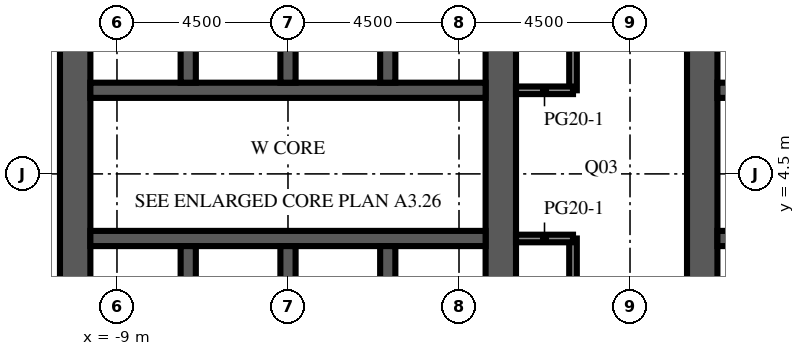
"""IFC4 building model, lengths in metres.
Left out: names, types, materials, properties, quantities, classifications, styles, units other than length and angle.
Written with IfcOpenShell. Run it as: python <this file> out.ifc"""

import sys

from ifc_helpers import new_model, si_unit, direction, frame, frame_2d, origin, place, context, subcontext, project, spatial, rectangle, extrude, element, fill, save


model = new_model("IFC4")
c1 = context("Model", 3, precision=1e-05, world=origin(), true_north=direction((0.0, 1.0)))
c2 = subcontext(c1, "Body", "Model", "MODEL_VIEW")
j1 = project(units=[si_unit("LENGTHUNIT", "METRE"), si_unit("PLANEANGLEUNIT", "RADIAN")], contexts=[c1])
p1 = place(None, origin())
s1 = spatial("IfcSite", under=j1, at=p1, CompositionType="ELEMENT")
p2 = place(p1, origin())
s2 = spatial("IfcBuilding", under=s1, at=p2, CompositionType="ELEMENT")
p3 = place(p2, frame((0.0, 0.0, 165.0)))
s3 = spatial("IfcBuildingStorey", under=s2, at=p3, CompositionType="ELEMENT", Elevation=165.0)
p4 = place(p3, frame((-10.1, -9.0, 0.0), z_axis=(0.0, 0.0, 1.0), x_axis=(0.0, 1.0, 0.0)))
e1 = element("IfcWall", 1, at=p4, inside=s3, PredefinedType="SHEAR", context=c2, shape_type="SweptSolid", body=[
    extrude(rectangle(XDim=27.5, YDim=0.8, at=frame_2d((13.75, 0.0))), origin(), (0.0, 0.0, 1.0), 4.1),
])
p5 = place(p4, frame((12.55, 0.0, 0.0)))
e2 = element("IfcOpeningElement", 2, at=p5, cuts=e1, PredefinedType="OPENING", context=c2, shape_type="SweptSolid", body=[
    extrude(rectangle(XDim=2.4, YDim=2.4, at=frame_2d((1.2, 1.2))), frame((0.0, 0.41, 0.0), z_axis=(0.0, -1.0, 0.0), x_axis=(1.0, 0.0, 0.0)), (0.0, 0.0, 1.0), 0.82),
])
p6 = place(p4, frame((6.825, 0.0, 0.0)))
e3 = element("IfcOpeningElement", 3, at=p6, cuts=e1, PredefinedType="OPENING", context=c2, shape_type="SweptSolid", body=[
    extrude(rectangle(XDim=1.2, YDim=2.1, at=frame_2d((0.6, 1.05))), frame((0.0, 0.41, 0.0), z_axis=(0.0, -1.0, 0.0), x_axis=(1.0, 0.0, 0.0)), (0.0, 0.0, 1.0), 0.82),
])
p7 = place(p4, frame((19.475, 0.0, 0.0)))
e4 = element("IfcOpeningElement", 4, at=p7, cuts=e1, PredefinedType="OPENING", context=c2, shape_type="SweptSolid", body=[
    extrude(rectangle(XDim=1.2, YDim=2.1, at=frame_2d((0.6, 1.05))), frame((0.0, 0.41, 0.0), z_axis=(0.0, -1.0, 0.0), x_axis=(1.0, 0.0, 0.0)), (0.0, 0.0, 1.0), 0.82),
])
p8 = place(p3, frame((1.1, -9.0, 0.0), z_axis=(0.0, 0.0, 1.0), x_axis=(0.0, 1.0, 0.0)))
e5 = element("IfcWall", 5, at=p8, inside=s3, PredefinedType="SHEAR", context=c2, shape_type="SweptSolid", body=[
    extrude(rectangle(XDim=27.5, YDim=0.8, at=frame_2d((13.75, 0.0))), origin(), (0.0, 0.0, 1.0), 4.1),
])
p9 = place(p8, frame((12.55, 0.0, 0.0)))
e6 = element("IfcOpeningElement", 6, at=p9, cuts=e5, PredefinedType="OPENING", context=c2, shape_type="SweptSolid", body=[
    extrude(rectangle(XDim=2.4, YDim=2.4, at=frame_2d((1.2, 1.2))), frame((0.0, 0.41, 0.0), z_axis=(0.0, -1.0, 0.0), x_axis=(1.0, 0.0, 0.0)), (0.0, 0.0, 1.0), 0.82),
])
p10 = place(p8, frame((3.95, 0.0, 0.0)))
e7 = element("IfcOpeningElement", 7, at=p10, cuts=e5, PredefinedType="OPENING", context=c2, shape_type="SweptSolid", body=[
    extrude(rectangle(XDim=1.2, YDim=2.1, at=frame_2d((0.6, 1.05))), frame((0.0, 0.41, 0.0), z_axis=(0.0, -1.0, 0.0), x_axis=(1.0, 0.0, 0.0)), (0.0, 0.0, 1.0), 0.82),
])
p11 = place(p8, frame((22.35, 0.0, 0.0)))
e8 = element("IfcOpeningElement", 8, at=p11, cuts=e5, PredefinedType="OPENING", context=c2, shape_type="SweptSolid", body=[
    extrude(rectangle(XDim=1.2, YDim=2.1, at=frame_2d((0.6, 1.05))), frame((0.0, 0.41, 0.0), z_axis=(0.0, -1.0, 0.0), x_axis=(1.0, 0.0, 0.0)), (0.0, 0.0, 1.0), 0.82),
])
p12 = place(p3, frame((-9.7, 2.8, 0.0), z_axis=(0.0, 0.0, 1.0), x_axis=(1.0, 0.0, 0.0)))
e9 = element("IfcWall", 9, at=p12, inside=s3, PredefinedType="SHEAR", context=c2, shape_type="SweptSolid", body=[
    extrude(rectangle(XDim=10.4, YDim=0.4, at=frame_2d((5.2, 0.0))), origin(), (0.0, 0.0, 1.0), 4.1),
])
p13 = place(p12, frame((0.738, 0.0, 0.0)))
e10 = element("IfcOpeningElement", 10, at=p13, cuts=e9, PredefinedType="OPENING", context=c2, shape_type="SweptSolid", body=[
    extrude(rectangle(XDim=1.1, YDim=2.1, at=frame_2d((0.55, 1.05))), frame((0.0, 0.21, 0.0), z_axis=(0.0, -1.0, 0.0), x_axis=(1.0, 0.0, 0.0)), (0.0, 0.0, 1.0), 0.42),
])
p14 = place(p12, frame((3.337, 0.0, 0.0)))
e11 = element("IfcOpeningElement", 11, at=p14, cuts=e9, PredefinedType="OPENING", context=c2, shape_type="SweptSolid", body=[
    extrude(rectangle(XDim=1.1, YDim=2.1, at=frame_2d((0.55, 1.05))), frame((0.0, 0.21, 0.0), z_axis=(0.0, -1.0, 0.0), x_axis=(1.0, 0.0, 0.0)), (0.0, 0.0, 1.0), 0.42),
])
p15 = place(p12, frame((6.012, 0.0, 0.0)))
e12 = element("IfcOpeningElement", 12, at=p15, cuts=e9, PredefinedType="OPENING", context=c2, shape_type="SweptSolid", body=[
    extrude(rectangle(XDim=1.0, YDim=2.1, at=frame_2d((0.5, 1.05))), frame((0.0, 0.21, 0.0), z_axis=(0.0, -1.0, 0.0), x_axis=(1.0, 0.0, 0.0)), (0.0, 0.0, 1.0), 0.42),
])
p16 = place(p12, frame((8.613, 0.0, 0.0)))
e13 = element("IfcOpeningElement", 13, at=p16, cuts=e9, PredefinedType="OPENING", context=c2, shape_type="SweptSolid", body=[
    extrude(rectangle(XDim=1.0, YDim=2.1, at=frame_2d((0.5, 1.05))), frame((0.0, 0.21, 0.0), z_axis=(0.0, -1.0, 0.0), x_axis=(1.0, 0.0, 0.0)), (0.0, 0.0, 1.0), 0.42),
])
p17 = place(p3, frame((-9.7, 6.7, 0.0), z_axis=(0.0, 0.0, 1.0), x_axis=(1.0, 0.0, 0.0)))
e14 = element("IfcWall", 14, at=p17, inside=s3, PredefinedType="SHEAR", context=c2, shape_type="SweptSolid", body=[
    extrude(rectangle(XDim=10.4, YDim=0.4, at=frame_2d((5.2, 0.0))), origin(), (0.0, 0.0, 1.0), 4.1),
])
p18 = place(p17, frame((3.337, 0.0, 0.0)))
e15 = element("IfcOpeningElement", 15, at=p18, cuts=e14, PredefinedType="OPENING", context=c2, shape_type="SweptSolid", body=[
    extrude(rectangle(XDim=1.1, YDim=2.1, at=frame_2d((0.55, 1.05))), frame((0.0, 0.21, 0.0), z_axis=(0.0, -1.0, 0.0), x_axis=(1.0, 0.0, 0.0)), (0.0, 0.0, 1.0), 0.42),
])
p19 = place(p17, frame((5.962, 0.0, 0.0)))
e16 = element("IfcOpeningElement", 16, at=p19, cuts=e14, PredefinedType="OPENING", context=c2, shape_type="SweptSolid", body=[
    extrude(rectangle(XDim=1.1, YDim=2.1, at=frame_2d((0.55, 1.05))), frame((0.0, 0.21, 0.0), z_axis=(0.0, -1.0, 0.0), x_axis=(1.0, 0.0, 0.0)), (0.0, 0.0, 1.0), 0.42),
])
p20 = place(p17, frame((8.663, 0.0, 0.0)))
e17 = element("IfcOpeningElement", 17, at=p20, cuts=e14, PredefinedType="OPENING", context=c2, shape_type="SweptSolid", body=[
    extrude(rectangle(XDim=1.1, YDim=2.1, at=frame_2d((0.55, 1.05))), frame((0.0, 0.21, 0.0), z_axis=(0.0, -1.0, 0.0), x_axis=(1.0, 0.0, 0.0)), (0.0, 0.0, 1.0), 0.42),
])
p21 = place(p17, frame((0.688, 0.0, 0.0)))
e18 = element("IfcOpeningElement", 18, at=p21, cuts=e14, PredefinedType="OPENING", context=c2, shape_type="SweptSolid", body=[
    extrude(rectangle(XDim=1.0, YDim=2.1, at=frame_2d((0.5, 1.05))), frame((0.0, 0.21, 0.0), z_axis=(0.0, -1.0, 0.0), x_axis=(1.0, 0.0, 0.0)), (0.0, 0.0, 1.0), 0.42),
])
for number, where, z_axis, x_axis in (
    (19, (-7.125, -0.3, 0.0), (0.0, 0.0, 1.0), (0.0, 1.0, 0.0)),
    (20, (-7.125, 6.9, 0.0), (0.0, 0.0, 1.0), (0.0, 1.0, 0.0)),
    (21, (-4.5, -0.3, 0.0), (0.0, 0.0, 1.0), (0.0, 1.0, 0.0)),
    (22, (-4.5, 6.9, 0.0), (0.0, 0.0, 1.0), (0.0, 1.0, 0.0)),
    (23, (-1.875, -0.3, 0.0), (0.0, 0.0, 1.0), (0.0, 1.0, 0.0)),
    (24, (-1.875, 6.9, 0.0), (0.0, 0.0, 1.0), (0.0, 1.0, 0.0)),
):
    element("IfcWall", number, at=place(p3, frame(where, z_axis=z_axis, x_axis=x_axis)), inside=s3, PredefinedType="SHEAR", context=c2, shape_type="SweptSolid", body=[
        extrude(rectangle(XDim=2.9, YDim=0.4, at=frame_2d((1.45, 0.0))), origin(), (0.0, 0.0, 1.0), 4.1),
    ])
p22 = place(p3, frame((6.4, -9.0, 0.0), z_axis=(0.0, 0.0, 1.0), x_axis=(0.0, 1.0, 0.0)))
e25 = element("IfcWall", 25, at=p22, inside=s3, PredefinedType="SHEAR", context=c2, shape_type="SweptSolid", body=[
    extrude(rectangle(XDim=27.5, YDim=0.8, at=frame_2d((13.75, 0.0))), origin(), (0.0, 0.0, 1.0), 4.1),
])
p23 = place(p22, frame((12.55, 0.0, 0.0)))
e26 = element("IfcOpeningElement", 26, at=p23, cuts=e25, PredefinedType="OPENING", context=c2, shape_type="SweptSolid", body=[
    extrude(rectangle(XDim=2.4, YDim=2.4, at=frame_2d((1.2, 1.2))), frame((0.0, 0.41, 0.0), z_axis=(0.0, -1.0, 0.0), x_axis=(1.0, 0.0, 0.0)), (0.0, 0.0, 1.0), 0.82),
])
p24 = place(p22, frame((3.95, 0.0, 0.0)))
e27 = element("IfcOpeningElement", 27, at=p24, cuts=e25, PredefinedType="OPENING", context=c2, shape_type="SweptSolid", body=[
    extrude(rectangle(XDim=1.2, YDim=2.1, at=frame_2d((0.6, 1.05))), frame((0.0, 0.41, 0.0), z_axis=(0.0, -1.0, 0.0), x_axis=(1.0, 0.0, 0.0)), (0.0, 0.0, 1.0), 0.82),
])
p25 = place(p22, frame((22.35, 0.0, 0.0)))
e28 = element("IfcOpeningElement", 28, at=p25, cuts=e25, PredefinedType="OPENING", context=c2, shape_type="SweptSolid", body=[
    extrude(rectangle(XDim=1.2, YDim=2.1, at=frame_2d((0.6, 1.05))), frame((0.0, 0.41, 0.0), z_axis=(0.0, -1.0, 0.0), x_axis=(1.0, 0.0, 0.0)), (0.0, 0.0, 1.0), 0.82),
])
p26 = place(p3, frame((6.8, 2.8, 0.0), z_axis=(0.0, 0.0, 1.0), x_axis=(1.0, 0.0, 0.0)))
e29 = element("IfcWall", 29, at=p26, inside=s3, PredefinedType="SHEAR", context=c2, shape_type="SweptSolid", body=[
    extrude(rectangle(XDim=10.4, YDim=0.4, at=frame_2d((5.2, 0.0))), origin(), (0.0, 0.0, 1.0), 4.1),
])
p27 = place(p26, frame((0.738, 0.0, 0.0)))
e30 = element("IfcOpeningElement", 30, at=p27, cuts=e29, PredefinedType="OPENING", context=c2, shape_type="SweptSolid", body=[
    extrude(rectangle(XDim=1.1, YDim=2.1, at=frame_2d((0.55, 1.05))), frame((0.0, 0.21, 0.0), z_axis=(0.0, -1.0, 0.0), x_axis=(1.0, 0.0, 0.0)), (0.0, 0.0, 1.0), 0.42),
])
p28 = place(p26, frame((3.337, 0.0, 0.0)))
e31 = element("IfcOpeningElement", 31, at=p28, cuts=e29, PredefinedType="OPENING", context=c2, shape_type="SweptSolid", body=[
    extrude(rectangle(XDim=1.1, YDim=2.1, at=frame_2d((0.55, 1.05))), frame((0.0, 0.21, 0.0), z_axis=(0.0, -1.0, 0.0), x_axis=(1.0, 0.0, 0.0)), (0.0, 0.0, 1.0), 0.42),
])
p29 = place(p26, frame((6.012, 0.0, 0.0)))
e32 = element("IfcOpeningElement", 32, at=p29, cuts=e29, PredefinedType="OPENING", context=c2, shape_type="SweptSolid", body=[
    extrude(rectangle(XDim=1.0, YDim=2.1, at=frame_2d((0.5, 1.05))), frame((0.0, 0.21, 0.0), z_axis=(0.0, -1.0, 0.0), x_axis=(1.0, 0.0, 0.0)), (0.0, 0.0, 1.0), 0.42),
])
p30 = place(p26, frame((8.613, 0.0, 0.0)))
e33 = element("IfcOpeningElement", 33, at=p30, cuts=e29, PredefinedType="OPENING", context=c2, shape_type="SweptSolid", body=[
    extrude(rectangle(XDim=1.0, YDim=2.1, at=frame_2d((0.5, 1.05))), frame((0.0, 0.21, 0.0), z_axis=(0.0, -1.0, 0.0), x_axis=(1.0, 0.0, 0.0)), (0.0, 0.0, 1.0), 0.42),
])
p31 = place(p3, frame((6.8, 6.7, 0.0), z_axis=(0.0, 0.0, 1.0), x_axis=(1.0, 0.0, 0.0)))
e34 = element("IfcWall", 34, at=p31, inside=s3, PredefinedType="SHEAR", context=c2, shape_type="SweptSolid", body=[
    extrude(rectangle(XDim=10.4, YDim=0.4, at=frame_2d((5.2, 0.0))), origin(), (0.0, 0.0, 1.0), 4.1),
])
p32 = place(p31, frame((3.337, 0.0, 0.0)))
e35 = element("IfcOpeningElement", 35, at=p32, cuts=e34, PredefinedType="OPENING", context=c2, shape_type="SweptSolid", body=[
    extrude(rectangle(XDim=1.1, YDim=2.1, at=frame_2d((0.55, 1.05))), frame((0.0, 0.21, 0.0), z_axis=(0.0, -1.0, 0.0), x_axis=(1.0, 0.0, 0.0)), (0.0, 0.0, 1.0), 0.42),
])
p33 = place(p31, frame((5.962, 0.0, 0.0)))
e36 = element("IfcOpeningElement", 36, at=p33, cuts=e34, PredefinedType="OPENING", context=c2, shape_type="SweptSolid", body=[
    extrude(rectangle(XDim=1.1, YDim=2.1, at=frame_2d((0.55, 1.05))), frame((0.0, 0.21, 0.0), z_axis=(0.0, -1.0, 0.0), x_axis=(1.0, 0.0, 0.0)), (0.0, 0.0, 1.0), 0.42),
])
p34 = place(p31, frame((8.663, 0.0, 0.0)))
e37 = element("IfcOpeningElement", 37, at=p34, cuts=e34, PredefinedType="OPENING", context=c2, shape_type="SweptSolid", body=[
    extrude(rectangle(XDim=1.1, YDim=2.1, at=frame_2d((0.55, 1.05))), frame((0.0, 0.21, 0.0), z_axis=(0.0, -1.0, 0.0), x_axis=(1.0, 0.0, 0.0)), (0.0, 0.0, 1.0), 0.42),
])
p35 = place(p31, frame((0.688, 0.0, 0.0)))
e38 = element("IfcOpeningElement", 38, at=p35, cuts=e34, PredefinedType="OPENING", context=c2, shape_type="SweptSolid", body=[
    extrude(rectangle(XDim=1.0, YDim=2.1, at=frame_2d((0.5, 1.05))), frame((0.0, 0.21, 0.0), z_axis=(0.0, -1.0, 0.0), x_axis=(1.0, 0.0, 0.0)), (0.0, 0.0, 1.0), 0.42),
])
p36 = place(p3, frame((3.0, -3.5, 0.0), z_axis=(0.0, 0.0, 1.0), x_axis=(0.0, 1.0, 0.0)))
e39 = element("IfcWall", 39, at=p36, inside=s3, PredefinedType="PARTITIONING", context=c2, shape_type="SweptSolid", body=[
    extrude(rectangle(XDim=6.3, YDim=0.2, at=frame_2d((3.15, 0.0))), origin(), (0.0, 0.0, 1.0), 3.65),
])
p37 = place(p36, frame((2.85, 0.0, 0.0)))
e40 = element("IfcOpeningElement", 40, at=p37, cuts=e39, PredefinedType="OPENING", context=c2, shape_type="SweptSolid", body=[
    extrude(rectangle(XDim=1.0, YDim=2.1, at=frame_2d((0.5, 1.05))), frame((0.0, 0.11, 0.0), z_axis=(0.0, -1.0, 0.0), x_axis=(1.0, 0.0, 0.0)), (0.0, 0.0, 1.0), 0.22),
])
p38 = place(p3, frame((3.0, 6.7, 0.0), z_axis=(0.0, 0.0, 1.0), x_axis=(0.0, 1.0, 0.0)))
e41 = element("IfcWall", 41, at=p38, inside=s3, PredefinedType="PARTITIONING", context=c2, shape_type="SweptSolid", body=[
    extrude(rectangle(XDim=11.8, YDim=0.2, at=frame_2d((5.9, 0.0))), origin(), (0.0, 0.0, 1.0), 3.65),
])
p39 = place(p38, frame((5.35, 0.0, 0.0)))
e42 = element("IfcOpeningElement", 42, at=p39, cuts=e41, PredefinedType="OPENING", context=c2, shape_type="SweptSolid", body=[
    extrude(rectangle(XDim=1.0, YDim=2.1, at=frame_2d((0.5, 1.05))), frame((0.0, 0.11, 0.0), z_axis=(0.0, -1.0, 0.0), x_axis=(1.0, 0.0, 0.0)), (0.0, 0.0, 1.0), 0.22),
])
for number, where, z_axis, x_axis in (
    (43, (1.5, 2.8, 0.0), (0.0, 0.0, 1.0), (1.0, 0.0, 0.0)),
    (44, (1.5, 6.7, 0.0), (0.0, 0.0, 1.0), (1.0, 0.0, 0.0)),
):
    element("IfcWall", number, at=place(p3, frame(where, z_axis=z_axis, x_axis=x_axis)), inside=s3, PredefinedType="PARTITIONING", context=c2, shape_type="SweptSolid", body=[
        extrude(rectangle(XDim=1.5, YDim=0.2, at=frame_2d((0.75, 0.0))), origin(), (0.0, 0.0, 1.0), 3.65),
    ])
p40 = place(p13, origin())
e45 = element("IfcDoor", 45, at=p40, inside=s3, OperationType="DOUBLE_DOOR_SLIDING", PredefinedType="DOOR", context=c2, shape_type="SweptSolid", body=[
    extrude(rectangle(XDim=1.1, YDim=2.1, at=frame_2d((0.55, 1.05))), frame((0.0, 0.025, 0.0), z_axis=(0.0, -1.0, 0.0), x_axis=(1.0, 0.0, 0.0)), (0.0, 0.0, 1.0), 0.05),
])
fill(e10, e45)
p41 = place(p14, origin())
e46 = element("IfcDoor", 46, at=p41, inside=s3, OperationType="DOUBLE_DOOR_SLIDING", PredefinedType="DOOR", context=c2, shape_type="SweptSolid", body=[
    extrude(rectangle(XDim=1.1, YDim=2.1, at=frame_2d((0.55, 1.05))), frame((0.0, 0.025, 0.0), z_axis=(0.0, -1.0, 0.0), x_axis=(1.0, 0.0, 0.0)), (0.0, 0.0, 1.0), 0.05),
])
fill(e11, e46)
p42 = place(p18, origin())
e47 = element("IfcDoor", 47, at=p42, inside=s3, OperationType="DOUBLE_DOOR_SLIDING", PredefinedType="DOOR", context=c2, shape_type="SweptSolid", body=[
    extrude(rectangle(XDim=1.1, YDim=2.1, at=frame_2d((0.55, 1.05))), frame((0.0, 0.025, 0.0), z_axis=(0.0, -1.0, 0.0), x_axis=(1.0, 0.0, 0.0)), (0.0, 0.0, 1.0), 0.05),
])
fill(e15, e47)
p43 = place(p19, origin())
e48 = element("IfcDoor", 48, at=p43, inside=s3, OperationType="DOUBLE_DOOR_SLIDING", PredefinedType="DOOR", context=c2, shape_type="SweptSolid", body=[
    extrude(rectangle(XDim=1.1, YDim=2.1, at=frame_2d((0.55, 1.05))), frame((0.0, 0.025, 0.0), z_axis=(0.0, -1.0, 0.0), x_axis=(1.0, 0.0, 0.0)), (0.0, 0.0, 1.0), 0.05),
])
fill(e16, e48)
p44 = place(p20, origin())
e49 = element("IfcDoor", 49, at=p44, inside=s3, OperationType="DOUBLE_DOOR_SLIDING", PredefinedType="DOOR", context=c2, shape_type="SweptSolid", body=[
    extrude(rectangle(XDim=1.1, YDim=2.1, at=frame_2d((0.55, 1.05))), frame((0.0, 0.025, 0.0), z_axis=(0.0, -1.0, 0.0), x_axis=(1.0, 0.0, 0.0)), (0.0, 0.0, 1.0), 0.05),
])
fill(e17, e49)
p45 = place(p5, origin())
e50 = element("IfcDoor", 50, at=p45, inside=s3, OperationType="DOUBLE_DOOR_DOUBLE_SWING", PredefinedType="DOOR", context=c2, shape_type="SweptSolid", body=[
    extrude(rectangle(XDim=2.4, YDim=2.4, at=frame_2d((1.2, 1.2))), frame((0.0, 0.025, 0.0), z_axis=(0.0, -1.0, 0.0), x_axis=(1.0, 0.0, 0.0)), (0.0, 0.0, 1.0), 0.05),
])
fill(e2, e50)
p46 = place(p9, origin())
e51 = element("IfcDoor", 51, at=p46, inside=s3, OperationType="DOUBLE_DOOR_DOUBLE_SWING", PredefinedType="DOOR", context=c2, shape_type="SweptSolid", body=[
    extrude(rectangle(XDim=2.4, YDim=2.4, at=frame_2d((1.2, 1.2))), frame((0.0, 0.025, 0.0), z_axis=(0.0, -1.0, 0.0), x_axis=(1.0, 0.0, 0.0)), (0.0, 0.0, 1.0), 0.05),
])
fill(e6, e51)
p47 = place(p23, origin())
e52 = element("IfcDoor", 52, at=p47, inside=s3, OperationType="DOUBLE_DOOR_DOUBLE_SWING", PredefinedType="DOOR", context=c2, shape_type="SweptSolid", body=[
    extrude(rectangle(XDim=2.4, YDim=2.4, at=frame_2d((1.2, 1.2))), frame((0.0, 0.025, 0.0), z_axis=(0.0, -1.0, 0.0), x_axis=(1.0, 0.0, 0.0)), (0.0, 0.0, 1.0), 0.05),
])
fill(e26, e52)
p48 = place(p15, origin())
e53 = element("IfcDoor", 53, at=p48, inside=s3, OperationType="SINGLE_SWING_LEFT", PredefinedType="DOOR", context=c2, shape_type="SweptSolid", body=[
    extrude(rectangle(XDim=1.0, YDim=2.1, at=frame_2d((0.5, 1.05))), frame((0.0, 0.025, 0.0), z_axis=(0.0, -1.0, 0.0), x_axis=(1.0, 0.0, 0.0)), (0.0, 0.0, 1.0), 0.05),
])
fill(e12, e53)
p49 = place(p16, origin())
e54 = element("IfcDoor", 54, at=p49, inside=s3, OperationType="SINGLE_SWING_RIGHT", PredefinedType="DOOR", context=c2, shape_type="SweptSolid", body=[
    extrude(rectangle(XDim=1.0, YDim=2.1, at=frame_2d((0.5, 1.05))), frame((0.0, 0.025, 0.0), z_axis=(0.0, -1.0, 0.0), x_axis=(1.0, 0.0, 0.0)), (0.0, 0.0, 1.0), 0.05),
])
fill(e13, e54)
p50 = place(p21, origin())
e55 = element("IfcDoor", 55, at=p50, inside=s3, OperationType="SINGLE_SWING_LEFT", PredefinedType="DOOR", context=c2, shape_type="SweptSolid", body=[
    extrude(rectangle(XDim=1.0, YDim=2.1, at=frame_2d((0.5, 1.05))), frame((0.0, 0.025, 0.0), z_axis=(0.0, -1.0, 0.0), x_axis=(1.0, 0.0, 0.0)), (0.0, 0.0, 1.0), 0.05),
])
fill(e18, e55)
save(model, sys.argv[1])
